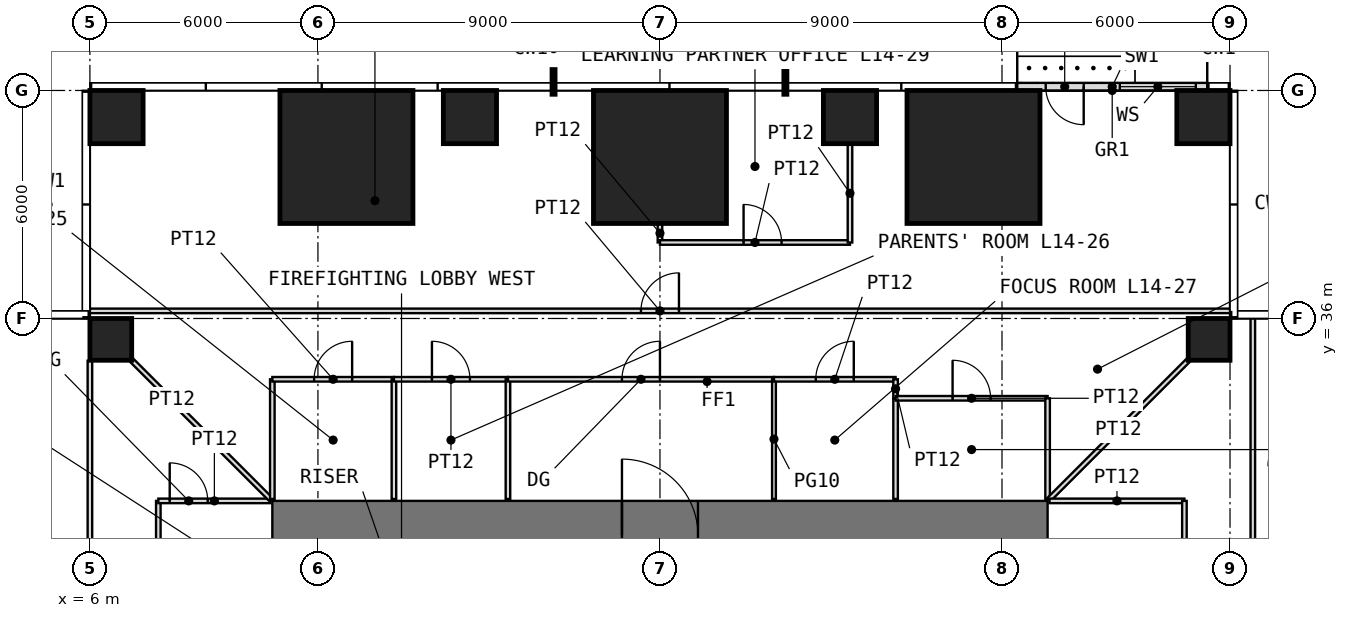
"""IFC4 building model, lengths in metres.
Left out: names, types, materials, properties, quantities, classifications, styles, units other than length and angle.
Written with IfcOpenShell. Run it as: python <this file> out.ifc"""

import sys

from ifc_helpers import new_model, si_unit, direction, frame, frame_2d, origin, origin_2d, place, context, subcontext, project, spatial, rectangle, extrude, element, fill, save


model = new_model("IFC4")
c1 = context("Model", 3, precision=1e-05, world=origin(), true_north=direction((0.0, 1.0)))
c2 = subcontext(c1, "Body", "Model", "MODEL_VIEW")
j1 = project(units=[si_unit("LENGTHUNIT", "METRE"), si_unit("PLANEANGLEUNIT", "RADIAN")], contexts=[c1])
p1 = place(None, origin())
s1 = spatial("IfcSite", under=j1, at=p1, CompositionType="ELEMENT")
p2 = place(p1, origin())
s2 = spatial("IfcBuilding", under=s1, at=p2, CompositionType="ELEMENT")
p3 = place(p2, frame((0.0, 0.0, 62.5)))
s3 = spatial("IfcBuildingStorey", under=s2, at=p3, CompositionType="ELEMENT", Elevation=62.5)
for number, where, z_axis, x_axis in (
    (1, (6.55, 35.45, 0.0), (0.0, 0.0, 1.0), (1.0, 0.0, 0.0)),
    (2, (35.45, 35.45, 0.0), (0.0, 0.0, 1.0), (1.0, 0.0, 0.0)),
):
    element("IfcColumn", number, at=place(p3, frame(where, z_axis=z_axis, x_axis=x_axis)), inside=s3, PredefinedType="COLUMN", context=c2, shape_type="SweptSolid", body=[
        extrude(rectangle(XDim=1.1, YDim=1.1, at=origin_2d()), origin(), (0.0, 0.0, 1.0), 4.0),
    ])
p4 = place(p3, frame((6.7, 41.3, 0.0), z_axis=(0.0, 0.0, 1.0), x_axis=(1.0, 0.0, 0.0)))
e3 = element("IfcColumn", 3, at=p4, inside=s3, PredefinedType="COLUMN", context=c2, shape_type="SweptSolid", body=[
    extrude(rectangle(XDim=1.4, YDim=1.4, at=origin_2d()), origin(), (0.0, 0.0, 1.0), 4.0),
])
p5 = place(p3, frame((12.75, 40.25, 0.0), z_axis=(0.0, 0.0, 1.0), x_axis=(1.0, 0.0, 0.0)))
e4 = element("IfcColumn", 4, at=p5, inside=s3, PredefinedType="COLUMN", context=c2, shape_type="SweptSolid", body=[
    extrude(rectangle(XDim=3.5, YDim=3.5, at=origin_2d()), origin(), (0.0, 0.0, 1.0), 4.0),
])
p6 = place(p3, frame((16.0, 41.3, 0.0), z_axis=(0.0, 0.0, 1.0), x_axis=(1.0, 0.0, 0.0)))
e5 = element("IfcColumn", 5, at=p6, inside=s3, PredefinedType="COLUMN", context=c2, shape_type="SweptSolid", body=[
    extrude(rectangle(XDim=1.4, YDim=1.4, at=origin_2d()), origin(), (0.0, 0.0, 1.0), 4.0),
])
p7 = place(p3, frame((21.0, 40.25, 0.0), z_axis=(0.0, 0.0, 1.0), x_axis=(1.0, 0.0, 0.0)))
e6 = element("IfcColumn", 6, at=p7, inside=s3, PredefinedType="COLUMN", context=c2, shape_type="SweptSolid", body=[
    extrude(rectangle(XDim=3.5, YDim=3.5, at=origin_2d()), origin(), (0.0, 0.0, 1.0), 4.0),
])
p8 = place(p3, frame((26.0, 41.3, 0.0), z_axis=(0.0, 0.0, 1.0), x_axis=(1.0, 0.0, 0.0)))
e7 = element("IfcColumn", 7, at=p8, inside=s3, PredefinedType="COLUMN", context=c2, shape_type="SweptSolid", body=[
    extrude(rectangle(XDim=1.4, YDim=1.4, at=origin_2d()), origin(), (0.0, 0.0, 1.0), 4.0),
])
p9 = place(p3, frame((29.25, 40.25, 0.0), z_axis=(0.0, 0.0, 1.0), x_axis=(1.0, 0.0, 0.0)))
e8 = element("IfcColumn", 8, at=p9, inside=s3, PredefinedType="COLUMN", context=c2, shape_type="SweptSolid", body=[
    extrude(rectangle(XDim=3.5, YDim=3.5, at=origin_2d()), origin(), (0.0, 0.0, 1.0), 4.0),
])
p10 = place(p3, frame((35.3, 41.3, 0.0), z_axis=(0.0, 0.0, 1.0), x_axis=(1.0, 0.0, 0.0)))
e9 = element("IfcColumn", 9, at=p10, inside=s3, PredefinedType="COLUMN", context=c2, shape_type="SweptSolid", body=[
    extrude(rectangle(XDim=1.4, YDim=1.4, at=origin_2d()), origin(), (0.0, 0.0, 1.0), 4.0),
])
p11 = place(p3, frame((35.4, 42.1, 0.0), z_axis=(0.0, 0.0, 1.0), x_axis=(-1.0, 0.0, 0.0)))
e10 = element("IfcWall", 10, at=p11, inside=s3, PredefinedType="USERDEFINED", context=c2, shape_type="SweptSolid", body=[
    extrude(rectangle(XDim=5.0, YDim=0.2, at=frame_2d((2.5, 0.0))), origin(), (0.0, 0.0, 1.0), 3.75),
])
p12 = place(p11, frame((3.25, 0.0, 0.0)))
e11 = element("IfcOpeningElement", 11, at=p12, cuts=e10, PredefinedType="OPENING", context=c2, shape_type="SweptSolid", body=[
    extrude(rectangle(XDim=1.0, YDim=2.4, at=frame_2d((0.5, 1.2))), frame((0.0, 0.11, 0.0), z_axis=(0.0, -1.0, 0.0), x_axis=(1.0, 0.0, 0.0)), (0.0, 0.0, 1.0), 0.22),
])
p13 = place(p11, frame((0.3, 0.0, 0.3)))
e12 = element("IfcOpeningElement", 12, at=p13, cuts=e10, PredefinedType="OPENING", context=c2, shape_type="SweptSolid", body=[
    extrude(rectangle(XDim=2.0, YDim=2.7, at=frame_2d((1.0, 1.35))), frame((0.0, 0.11, 0.0), z_axis=(0.0, -1.0, 0.0), x_axis=(1.0, 0.0, 0.0)), (0.0, 0.0, 1.0), 0.22),
])
p14 = place(p3, frame((10.8, 30.3, -0.05), z_axis=(0.0, 0.0, 1.0), x_axis=(1.0, 0.0, 0.0)))
e13 = element("IfcWall", 13, at=p14, inside=s3, PredefinedType="SHEAR", context=c2, shape_type="SweptSolid", body=[
    extrude(rectangle(XDim=20.4, YDim=1.8, at=frame_2d((10.2, 0.0))), origin(), (0.0, 0.0, 1.0), 4.0),
])
p15 = place(p14, frame((9.2, 0.0, 0.05)))
e14 = element("IfcOpeningElement", 14, at=p15, cuts=e13, PredefinedType="OPENING", context=c2, shape_type="SweptSolid", body=[
    extrude(rectangle(XDim=2.0, YDim=2.2, at=frame_2d((1.0, 1.1))), frame((0.0, 0.91, 0.0), z_axis=(0.0, -1.0, 0.0), x_axis=(1.0, 0.0, 0.0)), (0.0, 0.0, 1.0), 1.82),
])
p16 = place(p3, frame((6.0, 7.11, 0.0), z_axis=(0.0, 0.0, 1.0), x_axis=(0.0, 1.0, 0.0)))
e15 = element("IfcWall", 15, at=p16, inside=s3, PredefinedType="PARTITIONING", context=c2, shape_type="SweptSolid", body=[
    extrude(rectangle(XDim=27.78, YDim=0.12, at=frame_2d((13.89, 0.0))), origin(), (0.0, 0.0, 1.0), 3.75),
])
p17 = place(p16, frame((13.39, 0.0, 0.0)))
e16 = element("IfcOpeningElement", 16, at=p17, cuts=e15, PredefinedType="OPENING", context=c2, shape_type="SweptSolid", body=[
    extrude(rectangle(XDim=1.0, YDim=2.4, at=frame_2d((0.5, 1.2))), frame((0.0, 0.07, 0.0), z_axis=(0.0, -1.0, 0.0), x_axis=(1.0, 0.0, 0.0)), (0.0, 0.0, 1.0), 0.14),
])
p18 = place(p3, frame((6.0, 36.2, 0.0), z_axis=(0.0, 0.0, 1.0), x_axis=(1.0, 0.0, 0.0)))
e17 = element("IfcWall", 17, at=p18, inside=s3, PredefinedType="PARTITIONING", context=c2, shape_type="SweptSolid", body=[
    extrude(rectangle(XDim=30.0, YDim=0.12, at=frame_2d((15.0, 0.0))), origin(), (0.0, 0.0, 1.0), 3.75),
])
p19 = place(p18, frame((14.5, 0.0, 0.0)))
e18 = element("IfcOpeningElement", 18, at=p19, cuts=e17, PredefinedType="OPENING", context=c2, shape_type="SweptSolid", body=[
    extrude(rectangle(XDim=1.0, YDim=2.4, at=frame_2d((0.5, 1.2))), frame((0.0, 0.07, 0.0), z_axis=(0.0, -1.0, 0.0), x_axis=(1.0, 0.0, 0.0)), (0.0, 0.0, 1.0), 0.14),
])
p20 = place(p3, frame((7.11, 34.89, 0.0), z_axis=(0.0, 0.0, 1.0), x_axis=(0.707106781187, -0.707106781187, 0.0)))
e19 = element("IfcWall", 19, at=p20, inside=s3, PredefinedType="PARTITIONING", context=c2, shape_type="SweptSolid", body=[
    extrude(rectangle(XDim=2.95, YDim=0.12, at=frame_2d((1.475, 0.0))), origin(), (0.0, 0.0, 1.0), 3.75),
])
p21 = place(p3, frame((7.8, 28.4, 0.0), z_axis=(0.0, 0.0, 1.0), x_axis=(0.0, 1.0, 0.0)))
e20 = element("IfcWall", 20, at=p21, inside=s3, PredefinedType="PARTITIONING", context=c2, shape_type="SweptSolid", body=[
    extrude(rectangle(XDim=2.8, YDim=0.12, at=frame_2d((1.4, 0.0))), origin(), (0.0, 0.0, 1.0), 3.75),
])
p22 = place(p3, frame((7.8, 31.2, 0.0), z_axis=(0.0, 0.0, 1.0), x_axis=(1.0, 0.0, 0.0)))
e21 = element("IfcWall", 21, at=p22, inside=s3, PredefinedType="PARTITIONING", context=c2, shape_type="SweptSolid", body=[
    extrude(rectangle(XDim=2.95, YDim=0.12, at=frame_2d((1.475, 0.0))), origin(), (0.0, 0.0, 1.0), 3.75),
])
p23 = place(p22, frame((0.3, 0.0, 0.0)))
e22 = element("IfcOpeningElement", 22, at=p23, cuts=e21, PredefinedType="OPENING", context=c2, shape_type="SweptSolid", body=[
    extrude(rectangle(XDim=1.0, YDim=2.4, at=frame_2d((0.5, 1.2))), frame((0.0, 0.07, 0.0), z_axis=(0.0, -1.0, 0.0), x_axis=(1.0, 0.0, 0.0)), (0.0, 0.0, 1.0), 0.14),
])
p24 = place(p3, frame((9.196, 32.804, 0.0), z_axis=(0.0, 0.0, 1.0), x_axis=(0.707106781187, -0.707106781187, 0.0)))
e23 = element("IfcWall", 23, at=p24, inside=s3, PredefinedType="PARTITIONING", context=c2, shape_type="SweptSolid", body=[
    extrude(rectangle(XDim=2.218, YDim=0.12, at=frame_2d((1.109, 0.0))), origin(), (0.0, 0.0, 1.0), 3.75),
])
p25 = place(p3, frame((10.8, 31.25, 0.0), z_axis=(0.0, 0.0, 1.0), x_axis=(0.0, 1.0, 0.0)))
e24 = element("IfcWall", 24, at=p25, inside=s3, PredefinedType="PARTITIONING", context=c2, shape_type="SweptSolid", body=[
    extrude(rectangle(XDim=3.15, YDim=0.12, at=frame_2d((1.575, 0.0))), origin(), (0.0, 0.0, 1.0), 3.75),
])
p26 = place(p3, frame((10.8, 34.4, 0.0), z_axis=(0.0, 0.0, 1.0), x_axis=(1.0, 0.0, 0.0)))
e25 = element("IfcWall", 25, at=p26, inside=s3, PredefinedType="PARTITIONING", context=c2, shape_type="SweptSolid", body=[
    extrude(rectangle(XDim=3.2, YDim=0.12, at=frame_2d((1.6, 0.0))), origin(), (0.0, 0.0, 1.0), 3.75),
])
p27 = place(p26, frame((1.1, 0.0, 0.0)))
e26 = element("IfcOpeningElement", 26, at=p27, cuts=e25, PredefinedType="OPENING", context=c2, shape_type="SweptSolid", body=[
    extrude(rectangle(XDim=1.0, YDim=2.2, at=frame_2d((0.5, 1.1))), frame((0.0, 0.07, 0.0), z_axis=(0.0, -1.0, 0.0), x_axis=(1.0, 0.0, 0.0)), (0.0, 0.0, 1.0), 0.14),
])
p28 = place(p3, frame((14.0, 31.25, 0.0), z_axis=(0.0, 0.0, 1.0), x_axis=(0.0, 1.0, 0.0)))
e27 = element("IfcWall", 27, at=p28, inside=s3, PredefinedType="PARTITIONING", context=c2, shape_type="SweptSolid", body=[
    extrude(rectangle(XDim=3.15, YDim=0.12, at=frame_2d((1.575, 0.0))), origin(), (0.0, 0.0, 1.0), 3.75),
])
p29 = place(p3, frame((14.0, 34.4, 0.0), z_axis=(0.0, 0.0, 1.0), x_axis=(1.0, 0.0, 0.0)))
e28 = element("IfcWall", 28, at=p29, inside=s3, PredefinedType="PARTITIONING", context=c2, shape_type="SweptSolid", body=[
    extrude(rectangle(XDim=3.0, YDim=0.12, at=frame_2d((1.5, 0.0))), origin(), (0.0, 0.0, 1.0), 3.75),
])
p30 = place(p29, frame((1.0, 0.0, 0.0)))
e29 = element("IfcOpeningElement", 29, at=p30, cuts=e28, PredefinedType="OPENING", context=c2, shape_type="SweptSolid", body=[
    extrude(rectangle(XDim=1.0, YDim=2.2, at=frame_2d((0.5, 1.1))), frame((0.0, 0.07, 0.0), z_axis=(0.0, -1.0, 0.0), x_axis=(1.0, 0.0, 0.0)), (0.0, 0.0, 1.0), 0.14),
])
p31 = place(p3, frame((17.0, 31.25, 0.0), z_axis=(0.0, 0.0, 1.0), x_axis=(0.0, 1.0, 0.0)))
e30 = element("IfcWall", 30, at=p31, inside=s3, PredefinedType="PARTITIONING", context=c2, shape_type="SweptSolid", body=[
    extrude(rectangle(XDim=3.15, YDim=0.12, at=frame_2d((1.575, 0.0))), origin(), (0.0, 0.0, 1.0), 3.75),
])
p32 = place(p3, frame((17.0, 34.4, 0.0), z_axis=(0.0, 0.0, 1.0), x_axis=(1.0, 0.0, 0.0)))
e31 = element("IfcWall", 31, at=p32, inside=s3, PredefinedType="PARTITIONING", context=c2, shape_type="SweptSolid", body=[
    extrude(rectangle(XDim=7.0, YDim=0.12, at=frame_2d((3.5, 0.0))), origin(), (0.0, 0.0, 1.0), 3.75),
])
p33 = place(p32, frame((3.0, 0.0, 0.0)))
e32 = element("IfcOpeningElement", 32, at=p33, cuts=e31, PredefinedType="OPENING", context=c2, shape_type="SweptSolid", body=[
    extrude(rectangle(XDim=1.0, YDim=2.4, at=frame_2d((0.5, 1.2))), frame((0.0, 0.07, 0.0), z_axis=(0.0, -1.0, 0.0), x_axis=(1.0, 0.0, 0.0)), (0.0, 0.0, 1.0), 0.14),
])
p34 = place(p3, frame((21.0, 38.0, 0.0), z_axis=(0.0, 0.0, 1.0), x_axis=(0.0, 1.0, 0.0)))
e33 = element("IfcWall", 33, at=p34, inside=s3, PredefinedType="PARTITIONING", context=c2, shape_type="SweptSolid", body=[
    extrude(rectangle(XDim=0.49, YDim=0.12, at=frame_2d((0.245, 0.0))), origin(), (0.0, 0.0, 1.0), 3.75),
])
p35 = place(p3, frame((21.0, 38.0, 0.0), z_axis=(0.0, 0.0, 1.0), x_axis=(1.0, 0.0, 0.0)))
e34 = element("IfcWall", 34, at=p35, inside=s3, PredefinedType="PARTITIONING", context=c2, shape_type="SweptSolid", body=[
    extrude(rectangle(XDim=5.0, YDim=0.12, at=frame_2d((2.5, 0.0))), origin(), (0.0, 0.0, 1.0), 3.75),
])
p36 = place(p35, frame((2.2, 0.0, 0.0)))
e35 = element("IfcOpeningElement", 35, at=p36, cuts=e34, PredefinedType="OPENING", context=c2, shape_type="SweptSolid", body=[
    extrude(rectangle(XDim=1.0, YDim=2.2, at=frame_2d((0.5, 1.1))), frame((0.0, 0.07, 0.0), z_axis=(0.0, -1.0, 0.0), x_axis=(1.0, 0.0, 0.0)), (0.0, 0.0, 1.0), 0.14),
])
p37 = place(p3, frame((24.0, 31.25, 0.0), z_axis=(0.0, 0.0, 1.0), x_axis=(0.0, 1.0, 0.0)))
e36 = element("IfcWall", 36, at=p37, inside=s3, PredefinedType="PARTITIONING", context=c2, shape_type="SweptSolid", body=[
    extrude(rectangle(XDim=3.15, YDim=0.1, at=frame_2d((1.575, 0.0))), origin(), (0.0, 0.0, 1.0), 3.75),
])
p38 = place(p3, frame((24.0, 34.4, 0.0), z_axis=(0.0, 0.0, 1.0), x_axis=(1.0, 0.0, 0.0)))
e37 = element("IfcWall", 37, at=p38, inside=s3, PredefinedType="PARTITIONING", context=c2, shape_type="SweptSolid", body=[
    extrude(rectangle(XDim=3.2, YDim=0.12, at=frame_2d((1.6, 0.0))), origin(), (0.0, 0.0, 1.0), 3.75),
])
p39 = place(p38, frame((1.1, 0.0, 0.0)))
e38 = element("IfcOpeningElement", 38, at=p39, cuts=e37, PredefinedType="OPENING", context=c2, shape_type="SweptSolid", body=[
    extrude(rectangle(XDim=1.0, YDim=2.4, at=frame_2d((0.5, 1.2))), frame((0.0, 0.07, 0.0), z_axis=(0.0, -1.0, 0.0), x_axis=(1.0, 0.0, 0.0)), (0.0, 0.0, 1.0), 0.14),
])
p40 = place(p3, frame((26.0, 38.0, 0.0), z_axis=(0.0, 0.0, 1.0), x_axis=(0.0, 1.0, 0.0)))
e39 = element("IfcWall", 39, at=p40, inside=s3, PredefinedType="PARTITIONING", context=c2, shape_type="SweptSolid", body=[
    extrude(rectangle(XDim=2.59, YDim=0.12, at=frame_2d((1.295, 0.0))), origin(), (0.0, 0.0, 1.0), 3.75),
])
p41 = place(p3, frame((27.2, 31.25, 0.0), z_axis=(0.0, 0.0, 1.0), x_axis=(0.0, 1.0, 0.0)))
e40 = element("IfcWall", 40, at=p41, inside=s3, PredefinedType="PARTITIONING", context=c2, shape_type="SweptSolid", body=[
    extrude(rectangle(XDim=2.65, YDim=0.12, at=frame_2d((1.325, 0.0))), origin(), (0.0, 0.0, 1.0), 3.75),
])
p42 = place(p3, frame((27.2, 33.9, 0.0), z_axis=(0.0, 0.0, 1.0), x_axis=(0.0, 1.0, 0.0)))
e41 = element("IfcWall", 41, at=p42, inside=s3, PredefinedType="PARTITIONING", context=c2, shape_type="SweptSolid", body=[
    extrude(rectangle(XDim=0.5, YDim=0.12, at=frame_2d((0.25, 0.0))), origin(), (0.0, 0.0, 1.0), 3.75),
])
p43 = place(p3, frame((27.2, 33.9, 0.0), z_axis=(0.0, 0.0, 1.0), x_axis=(1.0, 0.0, 0.0)))
e42 = element("IfcWall", 42, at=p43, inside=s3, PredefinedType="PARTITIONING", context=c2, shape_type="SweptSolid", body=[
    extrude(rectangle(XDim=4.0, YDim=0.12, at=frame_2d((2.0, 0.0))), origin(), (0.0, 0.0, 1.0), 3.75),
])
p44 = place(p43, frame((1.5, 0.0, 0.0)))
e43 = element("IfcOpeningElement", 43, at=p44, cuts=e42, PredefinedType="OPENING", context=c2, shape_type="SweptSolid", body=[
    extrude(rectangle(XDim=1.0, YDim=2.2, at=frame_2d((0.5, 1.1))), frame((0.0, 0.07, 0.0), z_axis=(0.0, -1.0, 0.0), x_axis=(1.0, 0.0, 0.0)), (0.0, 0.0, 1.0), 0.14),
])
p45 = place(p3, frame((31.2, 31.25, 0.0), z_axis=(0.0, 0.0, 1.0), x_axis=(0.0, 1.0, 0.0)))
e44 = element("IfcWall", 44, at=p45, inside=s3, PredefinedType="PARTITIONING", context=c2, shape_type="SweptSolid", body=[
    extrude(rectangle(XDim=2.65, YDim=0.12, at=frame_2d((1.325, 0.0))), origin(), (0.0, 0.0, 1.0), 3.75),
])
p46 = place(p3, frame((31.235, 31.235, 0.0), z_axis=(0.0, 0.0, 1.0), x_axis=(0.707106781187, 0.707106781187, 0.0)))
e45 = element("IfcWall", 45, at=p46, inside=s3, PredefinedType="PARTITIONING", context=c2, shape_type="SweptSolid", body=[
    extrude(rectangle(XDim=5.168, YDim=0.12, at=frame_2d((2.584, 0.0))), origin(), (0.0, 0.0, 1.0), 3.75),
])
p47 = place(p3, frame((31.25, 31.2, 0.0), z_axis=(0.0, 0.0, 1.0), x_axis=(1.0, 0.0, 0.0)))
e46 = element("IfcWall", 46, at=p47, inside=s3, PredefinedType="PARTITIONING", context=c2, shape_type="SweptSolid", body=[
    extrude(rectangle(XDim=3.55, YDim=0.12, at=frame_2d((1.775, 0.0))), origin(), (0.0, 0.0, 1.0), 3.75),
])
p48 = place(p3, frame((34.8, 24.6, 0.0), z_axis=(0.0, 0.0, 1.0), x_axis=(0.0, 1.0, 0.0)))
e47 = element("IfcWall", 47, at=p48, inside=s3, PredefinedType="PARTITIONING", context=c2, shape_type="SweptSolid", body=[
    extrude(rectangle(XDim=6.6, YDim=0.12, at=frame_2d((3.3, 0.0))), origin(), (0.0, 0.0, 1.0), 3.75),
])
p49 = place(p48, frame((2.4, 0.0, 0.0)))
e48 = element("IfcOpeningElement", 48, at=p49, cuts=e47, PredefinedType="OPENING", context=c2, shape_type="SweptSolid", body=[
    extrude(rectangle(XDim=1.8, YDim=2.4, at=frame_2d((0.9, 1.2))), frame((0.0, 0.07, 0.0), z_axis=(0.0, -1.0, 0.0), x_axis=(1.0, 0.0, 0.0)), (0.0, 0.0, 1.0), 0.14),
])
p50 = place(p3, frame((36.6, 6.0, 0.0), z_axis=(0.0, 0.0, 1.0), x_axis=(0.0, 1.0, 0.0)))
e49 = element("IfcWall", 49, at=p50, inside=s3, PredefinedType="PARTITIONING", context=c2, shape_type="SweptSolid", body=[
    extrude(rectangle(XDim=30.0, YDim=0.12, at=frame_2d((15.0, 0.0))), origin(), (0.0, 0.0, 1.0), 3.75),
])
p51 = place(p50, frame((14.5, 0.0, 0.0)))
e50 = element("IfcOpeningElement", 50, at=p51, cuts=e49, PredefinedType="OPENING", context=c2, shape_type="SweptSolid", body=[
    extrude(rectangle(XDim=1.0, YDim=2.4, at=frame_2d((0.5, 1.2))), frame((0.0, 0.07, 0.0), z_axis=(0.0, -1.0, 0.0), x_axis=(1.0, 0.0, 0.0)), (0.0, 0.0, 1.0), 0.14),
])
p52 = place(p12, origin())
e51 = element("IfcDoor", 51, at=p52, inside=s3, OperationType="SINGLE_SWING_LEFT", PredefinedType="DOOR", context=c2, shape_type="SweptSolid", body=[
    extrude(rectangle(XDim=1.0, YDim=2.4, at=frame_2d((0.5, 1.2))), frame((0.0, 0.025, 0.0), z_axis=(0.0, -1.0, 0.0), x_axis=(1.0, 0.0, 0.0)), (0.0, 0.0, 1.0), 0.05),
])
fill(e11, e51)
p53 = place(p13, origin())
e52 = element("IfcWindow", 52, at=p53, inside=s3, PartitioningType="SINGLE_PANEL", PredefinedType="WINDOW", context=c2, shape_type="SweptSolid", body=[
    extrude(rectangle(XDim=2.0, YDim=2.7, at=frame_2d((1.0, 1.35))), frame((0.0, 0.03, 0.0), z_axis=(0.0, -1.0, 0.0), x_axis=(1.0, 0.0, 0.0)), (0.0, 0.0, 1.0), 0.06),
])
fill(e12, e52)
p54 = place(p15, origin())
e53 = element("IfcDoor", 53, at=p54, inside=s3, OperationType="DOUBLE_DOOR_SINGLE_SWING", PredefinedType="DOOR", context=c2, shape_type="SweptSolid", body=[
    extrude(rectangle(XDim=2.0, YDim=2.2, at=frame_2d((1.0, 1.1))), frame((0.0, 0.025, 0.0), z_axis=(0.0, -1.0, 0.0), x_axis=(1.0, 0.0, 0.0)), (0.0, 0.0, 1.0), 0.05),
])
fill(e14, e53)
p55 = place(p27, origin())
e54 = element("IfcDoor", 54, at=p55, inside=s3, OperationType="SINGLE_SWING_RIGHT", PredefinedType="DOOR", context=c2, shape_type="SweptSolid", body=[
    extrude(rectangle(XDim=1.0, YDim=2.2, at=frame_2d((0.5, 1.1))), frame((0.0, 0.025, 0.0), z_axis=(0.0, -1.0, 0.0), x_axis=(1.0, 0.0, 0.0)), (0.0, 0.0, 1.0), 0.05),
])
fill(e26, e54)
p56 = place(p30, origin())
e55 = element("IfcDoor", 55, at=p56, inside=s3, OperationType="SINGLE_SWING_LEFT", PredefinedType="DOOR", context=c2, shape_type="SweptSolid", body=[
    extrude(rectangle(XDim=1.0, YDim=2.2, at=frame_2d((0.5, 1.1))), frame((0.0, 0.025, 0.0), z_axis=(0.0, -1.0, 0.0), x_axis=(1.0, 0.0, 0.0)), (0.0, 0.0, 1.0), 0.05),
])
fill(e29, e55)
p57 = place(p39, origin())
e56 = element("IfcDoor", 56, at=p57, inside=s3, OperationType="SINGLE_SWING_RIGHT", PredefinedType="DOOR", context=c2, shape_type="SweptSolid", body=[
    extrude(rectangle(XDim=1.0, YDim=2.4, at=frame_2d((0.5, 1.2))), frame((0.0, 0.025, 0.0), z_axis=(0.0, -1.0, 0.0), x_axis=(1.0, 0.0, 0.0)), (0.0, 0.0, 1.0), 0.05),
])
fill(e38, e56)
p58 = place(p44, origin())
e57 = element("IfcDoor", 57, at=p58, inside=s3, OperationType="SINGLE_SWING_LEFT", PredefinedType="DOOR", context=c2, shape_type="SweptSolid", body=[
    extrude(rectangle(XDim=1.0, YDim=2.2, at=frame_2d((0.5, 1.1))), frame((0.0, 0.025, 0.0), z_axis=(0.0, -1.0, 0.0), x_axis=(1.0, 0.0, 0.0)), (0.0, 0.0, 1.0), 0.05),
])
fill(e43, e57)
p59 = place(p36, origin())
e58 = element("IfcDoor", 58, at=p59, inside=s3, OperationType="SINGLE_SWING_LEFT", PredefinedType="DOOR", context=c2, shape_type="SweptSolid", body=[
    extrude(rectangle(XDim=1.0, YDim=2.2, at=frame_2d((0.5, 1.1))), frame((0.0, 0.025, 0.0), z_axis=(0.0, -1.0, 0.0), x_axis=(1.0, 0.0, 0.0)), (0.0, 0.0, 1.0), 0.05),
])
fill(e35, e58)
p60 = place(p19, origin())
e59 = element("IfcDoor", 59, at=p60, inside=s3, OperationType="SINGLE_SWING_RIGHT", PredefinedType="DOOR", context=c2, shape_type="SweptSolid", body=[
    extrude(rectangle(XDim=1.0, YDim=2.4, at=frame_2d((0.5, 1.2))), frame((0.0, 0.025, 0.0), z_axis=(0.0, -1.0, 0.0), x_axis=(1.0, 0.0, 0.0)), (0.0, 0.0, 1.0), 0.05),
])
fill(e18, e59)
p61 = place(p33, origin())
e60 = element("IfcDoor", 60, at=p61, inside=s3, OperationType="SINGLE_SWING_RIGHT", PredefinedType="DOOR", context=c2, shape_type="SweptSolid", body=[
    extrude(rectangle(XDim=1.0, YDim=2.4, at=frame_2d((0.5, 1.2))), frame((0.0, 0.025, 0.0), z_axis=(0.0, -1.0, 0.0), x_axis=(1.0, 0.0, 0.0)), (0.0, 0.0, 1.0), 0.05),
])
fill(e32, e60)
p62 = place(p23, origin())
e61 = element("IfcDoor", 61, at=p62, inside=s3, OperationType="SINGLE_SWING_LEFT", PredefinedType="DOOR", context=c2, shape_type="SweptSolid", body=[
    extrude(rectangle(XDim=1.0, YDim=2.4, at=frame_2d((0.5, 1.2))), frame((0.0, 0.025, 0.0), z_axis=(0.0, -1.0, 0.0), x_axis=(1.0, 0.0, 0.0)), (0.0, 0.0, 1.0), 0.05),
])
fill(e22, e61)
save(model, sys.argv[1])
